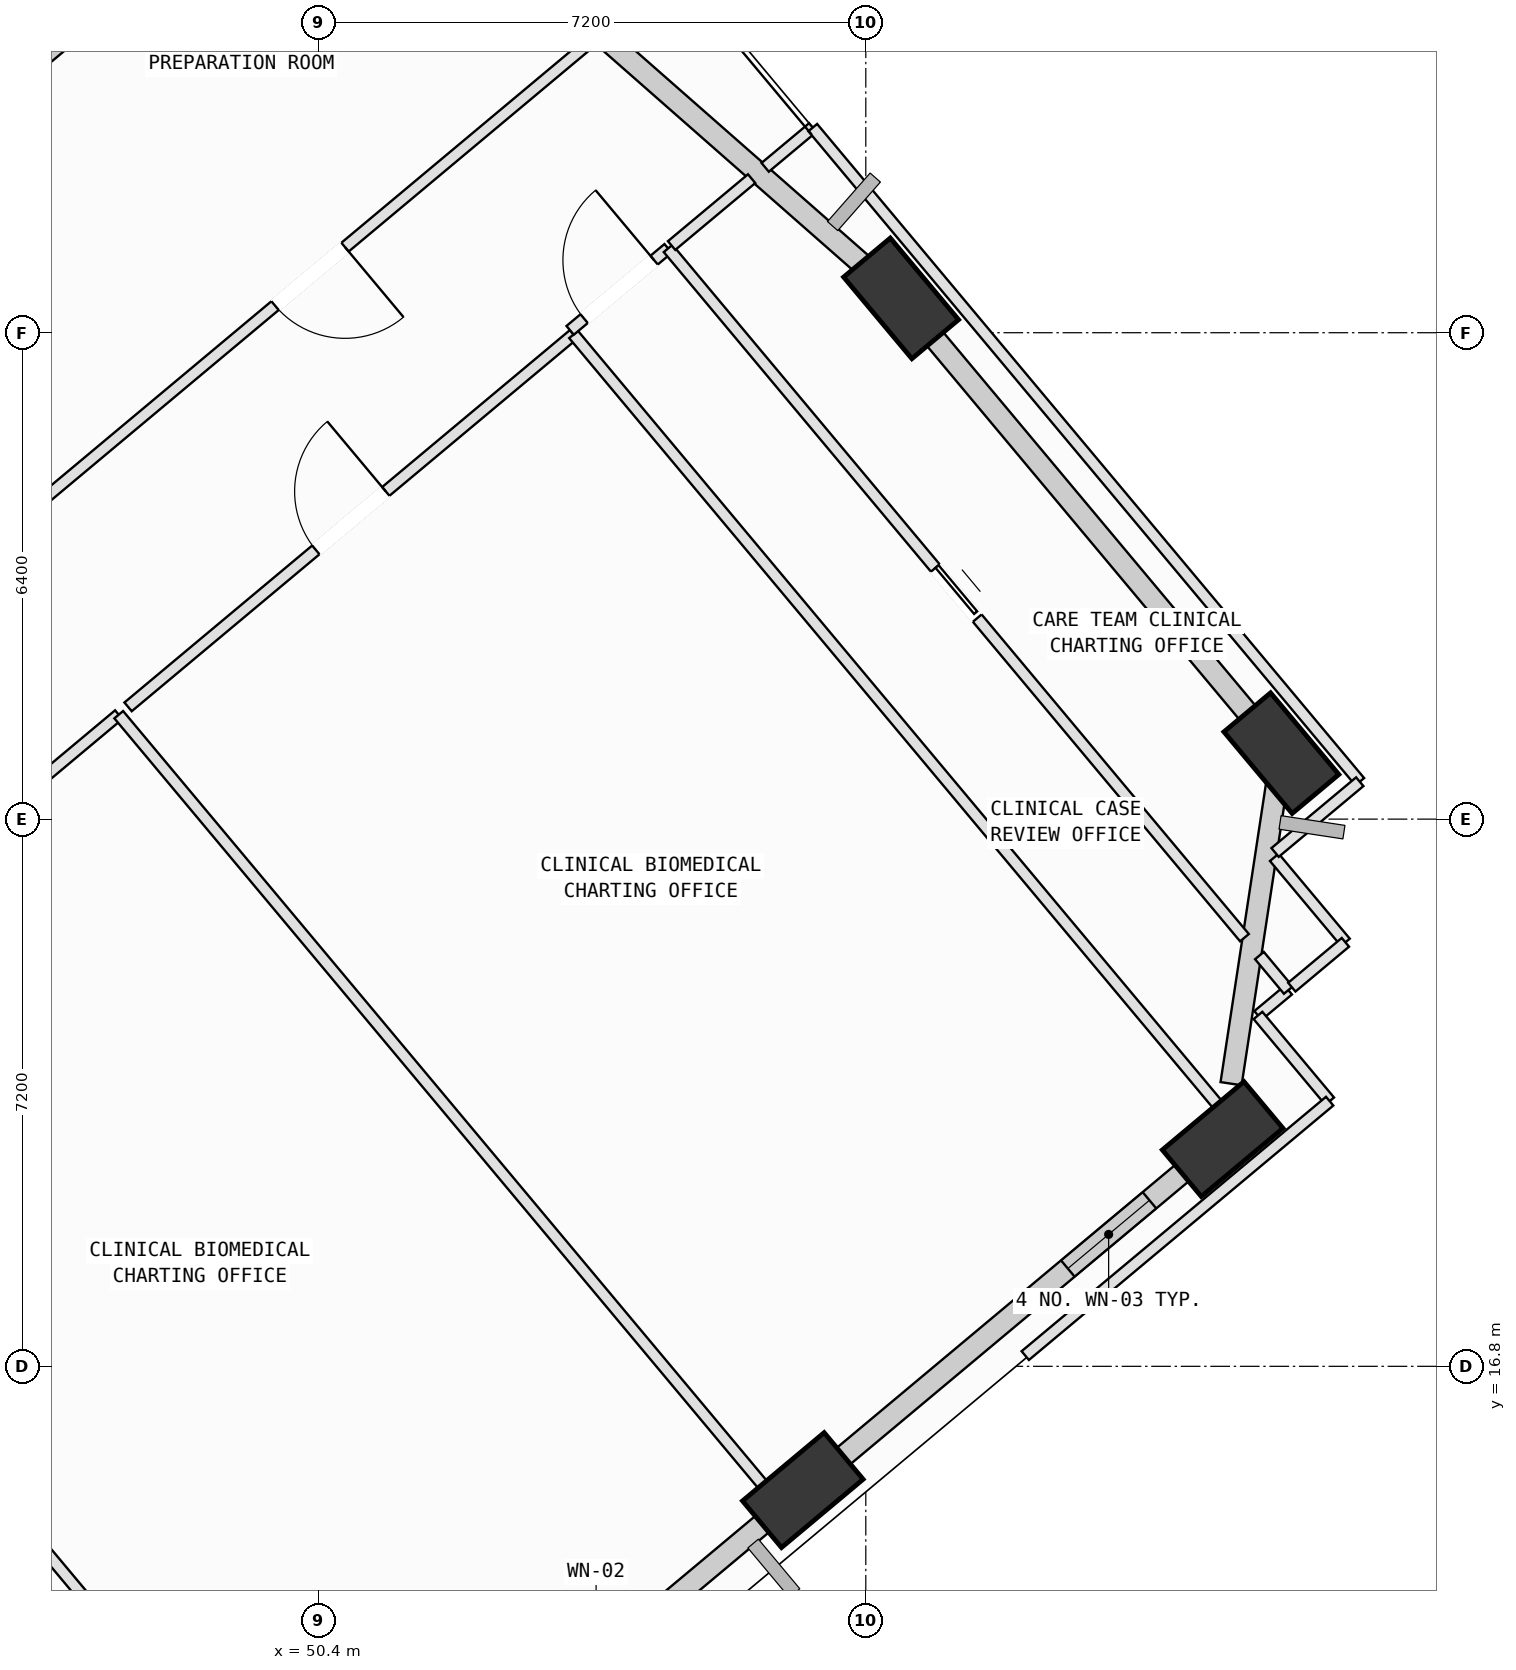
"""IFC4 building model, lengths in metres.
Left out: names, types, materials, properties, quantities, classifications, styles, units other than length and angle.
Written with IfcOpenShell. Run it as: python <this file> out.ifc"""

import sys

from ifc_helpers import new_model, si_unit, direction, frame, frame_2d, origin, origin_2d, place, context, subcontext, project, spatial, rectangle, extrude, element, fill, save


model = new_model("IFC4")
c1 = context("Model", 3, precision=1e-05, world=origin(), true_north=direction((0.0, 1.0)))
c2 = subcontext(c1, "Body", "Model", "MODEL_VIEW")
j1 = project(units=[si_unit("LENGTHUNIT", "METRE"), si_unit("PLANEANGLEUNIT", "RADIAN")], contexts=[c1])
p1 = place(None, origin())
s1 = spatial("IfcSite", under=j1, at=p1, CompositionType="ELEMENT")
p2 = place(p1, origin())
s2 = spatial("IfcBuilding", under=s1, at=p2, CompositionType="ELEMENT")
p3 = place(p2, frame((0.0, 0.0, 193.8)))
s3 = spatial("IfcBuildingStorey", under=s2, at=p3, CompositionType="ELEMENT", Elevation=193.8)
p4 = place(p3, frame((56.771, 15.172, 0.002), z_axis=(0.038888663532, 0.095824097484, 0.994638333361), x_axis=(-0.950777266838, -0.302691625146, 0.066335276659)))
e1 = element("IfcColumn", 1, at=p4, inside=s3, PredefinedType="COLUMN", context=c2, shape_type="SweptSolid", body=[
    extrude(rectangle(XDim=1.4, YDim=0.8, at=origin_2d()), origin(), (0.0, 0.0, 1.0), 4.018),
])
p5 = place(p3, frame((62.295, 19.79, 0.002), z_axis=(0.01965074563, 0.118268376478, 0.992787207473), x_axis=(-0.861169473964, -0.50246694011, 0.076903258768)))
e2 = element("IfcColumn", 2, at=p5, inside=s3, PredefinedType="COLUMN", context=c2, shape_type="SweptSolid", body=[
    extrude(rectangle(XDim=1.4, YDim=0.8, at=origin_2d()), origin(), (0.0, 0.0, 1.0), 4.025),
])
p6 = place(p3, frame((63.068, 24.868, 0.002), z_axis=(-0.001273441718, 0.121280163659, 0.992617499467), x_axis=(0.649409600176, -0.754724730488, 0.09304704396)))
e3 = element("IfcColumn", 3, at=p6, inside=s3, PredefinedType="COLUMN", context=c2, shape_type="SweptSolid", body=[
    extrude(rectangle(XDim=1.4, YDim=0.8, at=origin_2d()), origin(), (0.0, 0.0, 1.0), 4.026),
])
p7 = place(p3, frame((58.064, 30.852, 0.002), z_axis=(-0.025762365333, 0.100679809803, 0.994585278611), x_axis=(0.810575889279, -0.580181348715, 0.079726597341)))
e4 = element("IfcColumn", 4, at=p7, inside=s3, PredefinedType="COLUMN", context=c2, shape_type="SweptSolid", body=[
    extrude(rectangle(XDim=1.4, YDim=0.8, at=origin_2d()), origin(), (0.0, 0.0, 1.0), 4.018),
])
p8 = place(p3, frame((56.539, 14.977, 0.0), z_axis=(0.0, 0.0, 1.0), x_axis=(-0.767164687181, -0.641450187265, 0.0)))
e5 = element("IfcWall", 5, at=p8, inside=s3, PredefinedType="SOLIDWALL", context=c2, shape_type="SweptSolid", body=[
    extrude(rectangle(XDim=6.218, YDim=0.28, at=frame_2d((3.109, 0.0))), origin(), (0.0, 0.0, 1.0), 3.265),
])
p9 = place(p8, frame((2.242, 0.0, 0.75)))
e6 = element("IfcOpeningElement", 6, at=p9, cuts=e5, PredefinedType="OPENING", context=c2, shape_type="SweptSolid", body=[
    extrude(rectangle(XDim=2.0, YDim=1.95, at=frame_2d((1.0, 0.975))), frame((0.0, 0.15, 0.0), z_axis=(0.0, -1.0, 0.0), x_axis=(1.0, 0.0, 0.0)), (0.0, 0.0, 1.0), 0.3),
])
p10 = place(p3, frame((62.074, 19.605, 0.0), z_axis=(0.0, 0.0, 1.0), x_axis=(-0.76717519445, -0.641437620522, 0.0)))
e7 = element("IfcWall", 7, at=p10, inside=s3, PredefinedType="SOLIDWALL", context=c2, shape_type="SweptSolid", body=[
    extrude(rectangle(XDim=6.242, YDim=0.28, at=frame_2d((3.121, 0.0))), origin(), (0.0, 0.0, 1.0), 3.265),
])
p11 = place(p10, frame((0.968, 0.0, 0.75)))
e8 = element("IfcOpeningElement", 8, at=p11, cuts=e7, PredefinedType="OPENING", context=c2, shape_type="SweptSolid", body=[
    extrude(rectangle(XDim=1.4, YDim=1.85, at=frame_2d((0.7, 0.925))), frame((0.0, 0.15, 0.0), z_axis=(0.0, -1.0, 0.0), x_axis=(1.0, 0.0, 0.0)), (0.0, 0.0, 1.0), 0.3),
])
p12 = place(p3, frame((63.03, 24.617, 0.0), z_axis=(0.0, 0.0, 1.0), x_axis=(-0.150419472424, -0.988622264728, 0.0)))
e9 = element("IfcWall", 9, at=p12, inside=s3, PredefinedType="SOLIDWALL", context=c2, shape_type="SweptSolid", body=[
    extrude(rectangle(XDim=4.145, YDim=0.28, at=frame_2d((2.073, 0.0))), origin(), (0.0, 0.0, 1.0), 3.265),
])
p13 = place(p3, frame((58.256, 30.622, 0.0), z_axis=(0.0, 0.0, 1.0), x_axis=(0.641450946277, -0.767164052547, 0.0)))
e10 = element("IfcWall", 10, at=p13, inside=s3, PredefinedType="SOLIDWALL", context=c2, shape_type="SweptSolid", body=[
    extrude(rectangle(XDim=6.84, YDim=0.28, at=frame_2d((3.42, 0.0))), origin(), (0.0, 0.0, 1.0), 3.265),
])
p14 = place(p3, frame((50.934, 37.118, 0.0), z_axis=(0.0, 0.0, 1.0), x_axis=(0.751139162676, -0.660143892114, 0.0)))
e11 = element("IfcWall", 11, at=p14, inside=s3, PredefinedType="SOLIDWALL", context=c2, shape_type="SweptSolid", body=[
    extrude(rectangle(XDim=8.838, YDim=0.28, at=frame_2d((4.419, 0.0))), origin(), (0.0, 0.0, 1.0), 3.265),
])
p15 = place(p3, frame((46.197, 33.573, 0.0), z_axis=(0.0, 0.0, 1.0), x_axis=(0.767164976139, 0.641449841675, 0.0)))
e12 = element("IfcWall", 12, at=p15, inside=s3, PredefinedType="SOLIDWALL", context=c2, shape_type="SweptSolid", body=[
    extrude(rectangle(XDim=5.405, YDim=0.28, at=frame_2d((2.702, 0.0))), origin(), (0.0, 0.0, 1.0), 3.265),
])
p16 = place(p15, frame((1.698, 0.0, 0.75)))
e13 = element("IfcOpeningElement", 13, at=p16, cuts=e12, PredefinedType="OPENING", context=c2, shape_type="SweptSolid", body=[
    extrude(rectangle(XDim=2.0, YDim=1.95, at=frame_2d((1.0, 0.975))), frame((0.0, 0.15, 0.0), z_axis=(0.0, -1.0, 0.0), x_axis=(1.0, 0.0, 0.0)), (0.0, 0.0, 1.0), 0.3),
])
p17 = place(p3, frame((41.82, 20.333, 0.0), z_axis=(0.0, 0.0, 1.0), x_axis=(0.641441854708, -0.767171654213, 0.0)))
e14 = element("IfcWall", 14, at=p17, inside=s3, PredefinedType="PARTITIONING", context=c2, shape_type="SweptSolid", body=[
    extrude(rectangle(XDim=13.435, YDim=0.15, at=frame_2d((6.718, 0.0))), origin(), (0.0, 0.0, 1.0), 3.78),
])
p18 = place(p3, frame((41.91, 20.473, 0.0), z_axis=(0.0, 0.0, 1.0), x_axis=(0.767133193251, 0.641487851648, 0.0)))
e15 = element("IfcWall", 15, at=p18, inside=s3, PredefinedType="PARTITIONING", context=c2, shape_type="SweptSolid", body=[
    extrude(rectangle(XDim=7.64, YDim=0.15, at=frame_2d((3.82, 0.0))), origin(), (0.0, 0.0, 1.0), 3.065),
])
p19 = place(p18, frame((3.22, 0.0, 0.0)))
e16 = element("IfcOpeningElement", 16, at=p19, cuts=e15, PredefinedType="OPENING", context=c2, shape_type="SweptSolid", body=[
    extrude(rectangle(XDim=1.2, YDim=2.15, at=frame_2d((0.6, 1.075))), frame((0.0, 0.085, 0.0), z_axis=(0.0, -1.0, 0.0), x_axis=(1.0, 0.0, 0.0)), (0.0, 0.0, 1.0), 0.17),
])
p20 = place(p3, frame((47.771, 25.374, 0.0), z_axis=(0.0, 0.0, 1.0), x_axis=(0.6415100718, -0.767114611892, 0.0)))
e17 = element("IfcWall", 17, at=p20, inside=s3, PredefinedType="PARTITIONING", context=c2, shape_type="SweptSolid", body=[
    extrude(rectangle(XDim=13.486, YDim=0.15, at=frame_2d((6.743, 0.0))), origin(), (0.0, 0.0, 1.0), 3.78),
])
p21 = place(p3, frame((47.894, 25.477, 0.0), z_axis=(0.0, 0.0, 1.0), x_axis=(0.767198673316, 0.641409538176, 0.0)))
e18 = element("IfcWall", 18, at=p21, inside=s3, PredefinedType="PARTITIONING", context=c2, shape_type="SweptSolid", body=[
    extrude(rectangle(XDim=7.639, YDim=0.15, at=frame_2d((3.82, 0.0))), origin(), (0.0, 0.0, 1.0), 3.78),
])
p22 = place(p21, frame((3.22, 0.0, 0.0)))
e19 = element("IfcOpeningElement", 19, at=p22, cuts=e18, PredefinedType="OPENING", context=c2, shape_type="SweptSolid", body=[
    extrude(rectangle(XDim=1.2, YDim=2.15, at=frame_2d((0.6, 1.075))), frame((0.0, 0.085, 0.0), z_axis=(0.0, -1.0, 0.0), x_axis=(1.0, 0.0, 0.0)), (0.0, 0.0, 1.0), 0.17),
])
p23 = place(p3, frame((53.755, 30.377, 0.0), z_axis=(0.0, 0.0, 1.0), x_axis=(0.641485701033, -0.767134991621, 0.0)))
e20 = element("IfcWall", 20, at=p23, inside=s3, PredefinedType="PARTITIONING", context=c2, shape_type="SweptSolid", body=[
    extrude(rectangle(XDim=13.831, YDim=0.15, at=frame_2d((6.915, 0.0))), origin(), (0.0, 0.0, 1.0), 3.78),
])
p24 = place(p3, frame((62.627, 19.767, 0.0), z_axis=(0.0, 0.0, 1.0), x_axis=(-0.767652058526, -0.640866848137, 0.0)))
e21 = element("IfcWall", 21, at=p24, inside=s3, PredefinedType="PARTITIONING", context=c2, shape_type="SweptSolid", body=[
    extrude(rectangle(XDim=0.528, YDim=0.15, at=frame_2d((0.264, 0.0))), origin(), (0.0, 0.0, 1.0), 3.78),
])
p25 = place(p3, frame((57.433, 15.425, 0.0), z_axis=(0.0, 0.0, 1.0), x_axis=(-0.767508262314, -0.64103905285, 0.0)))
e22 = element("IfcWall", 22, at=p25, inside=s3, PredefinedType="PARTITIONING", context=c2, shape_type="SweptSolid", body=[
    extrude(rectangle(XDim=0.871, YDim=0.15, at=frame_2d((0.435, 0.0))), origin(), (0.0, 0.0, 1.0), 3.265),
])
p26 = place(p3, frame((54.015, 34.257, 0.0), z_axis=(0.0, 0.0, 1.0), x_axis=(-0.767176013294, -0.641436641163, 0.0)))
e23 = element("IfcWall", 23, at=p26, inside=s3, PredefinedType="PARTITIONING", context=c2, shape_type="SweptSolid", body=[
    extrude(rectangle(XDim=9.716, YDim=0.15, at=frame_2d((4.858, 0.0))), origin(), (0.0, 0.0, 1.0), 3.78),
])
p27 = place(p26, frame((4.258, 0.0, 0.0)))
e24 = element("IfcOpeningElement", 24, at=p27, cuts=e23, PredefinedType="OPENING", context=c2, shape_type="SweptSolid", body=[
    extrude(rectangle(XDim=1.2, YDim=2.15, at=frame_2d((0.6, 1.075))), frame((0.0, 0.085, 0.0), z_axis=(0.0, -1.0, 0.0), x_axis=(1.0, 0.0, 0.0)), (0.0, 0.0, 1.0), 0.17),
])
p28 = place(p3, frame((43.328, 31.891, 0.0), z_axis=(0.0, 0.0, 1.0), x_axis=(0.767175162843, 0.641437658324, 0.0)))
e25 = element("IfcWall", 25, at=p28, inside=s3, PredefinedType="PARTITIONING", context=c2, shape_type="SweptSolid", body=[
    extrude(rectangle(XDim=9.689, YDim=0.15, at=frame_2d((4.844, 0.0))), origin(), (0.0, 0.0, 1.0), 3.065),
])
p29 = place(p3, frame((63.159, 21.75, 0.0), z_axis=(0.0, 0.0, 1.0), x_axis=(-0.767681872286, -0.640831134515, 0.0)))
e26 = element("IfcWall", 26, at=p29, inside=s3, PredefinedType="PARTITIONING", context=c2, shape_type="SweptSolid", body=[
    extrude(rectangle(XDim=0.52, YDim=0.15, at=frame_2d((0.26, 0.0))), origin(), (0.0, 0.0, 1.0), 3.78),
])
p30 = place(p3, frame((62.76, 21.417, 0.0), z_axis=(0.0, 0.0, 1.0), x_axis=(0.641359746983, -0.767240298048, 0.0)))
e27 = element("IfcWall", 27, at=p30, inside=s3, PredefinedType="PARTITIONING", context=c2, shape_type="SweptSolid", body=[
    extrude(rectangle(XDim=1.47, YDim=0.15, at=frame_2d((0.735, 0.0))), origin(), (0.0, 0.0, 1.0), 3.78),
])
p31 = place(p3, frame((63.703, 20.289, 0.0), z_axis=(0.0, 0.0, 1.0), x_axis=(-0.767208256489, -0.641398075438, 0.0)))
e28 = element("IfcWall", 28, at=p31, inside=s3, PredefinedType="PARTITIONING", context=c2, shape_type="SweptSolid", body=[
    extrude(rectangle(XDim=5.22, YDim=0.15, at=frame_2d((2.61, 0.0))), origin(), (0.0, 0.0, 1.0), 3.78),
])
p32 = place(p3, frame((53.71, 30.431, 0.0), z_axis=(0.0, 0.0, 1.0), x_axis=(0.767076870152, 0.641555200491, 0.0)))
e29 = element("IfcWall", 29, at=p32, inside=s3, PredefinedType="PARTITIONING", context=c2, shape_type="SweptSolid", body=[
    extrude(rectangle(XDim=1.68, YDim=0.15, at=frame_2d((0.84, 0.0))), origin(), (0.0, 0.0, 1.0), 3.78),
])
p33 = place(p32, frame((0.24, 0.0, 0.0)))
e30 = element("IfcOpeningElement", 30, at=p33, cuts=e29, PredefinedType="OPENING", context=c2, shape_type="SweptSolid", body=[
    extrude(rectangle(XDim=1.2, YDim=2.15, at=frame_2d((0.6, 1.075))), frame((0.0, 0.085, 0.0), z_axis=(0.0, -1.0, 0.0), x_axis=(1.0, 0.0, 0.0)), (0.0, 0.0, 1.0), 0.17),
])
p34 = place(p3, frame((54.999, 31.509, 0.0), z_axis=(0.0, 0.0, 1.0), x_axis=(0.641453119542, -0.767162235404, 0.0)))
e31 = element("IfcWall", 31, at=p34, inside=s3, PredefinedType="PARTITIONING", context=c2, shape_type="SweptSolid", body=[
    extrude(rectangle(XDim=11.822, YDim=0.15, at=frame_2d((5.911, 0.0))), origin(), (0.0, 0.0, 1.0), 3.78),
])
p35 = place(p34, frame((5.481, 0.0, 0.0)))
e32 = element("IfcOpeningElement", 32, at=p35, cuts=e31, PredefinedType="OPENING", context=c2, shape_type="SweptSolid", body=[
    extrude(rectangle(XDim=0.86, YDim=2.06, at=frame_2d((0.43, 1.03))), frame((0.0, 0.085, 0.0), z_axis=(0.0, -1.0, 0.0), x_axis=(1.0, 0.0, 0.0)), (0.0, 0.0, 1.0), 0.17),
])
p36 = place(p3, frame((62.779, 22.205, 0.0), z_axis=(0.0, 0.0, 1.0), x_axis=(0.64083232284, -0.767680880317, 0.0)))
e33 = element("IfcWall", 33, at=p36, inside=s3, PredefinedType="PARTITIONING", context=c2, shape_type="SweptSolid", body=[
    extrude(rectangle(XDim=0.593, YDim=0.15, at=frame_2d((0.296, 0.0))), origin(), (0.0, 0.0, 1.0), 3.78),
])
p37 = place(p3, frame((62.975, 23.497, 0.0), z_axis=(0.0, 0.0, 1.0), x_axis=(0.641402859912, -0.767204256568, 0.0)))
e34 = element("IfcWall", 34, at=p37, inside=s3, PredefinedType="PARTITIONING", context=c2, shape_type="SweptSolid", body=[
    extrude(rectangle(XDim=1.458, YDim=0.15, at=frame_2d((0.729, 0.0))), origin(), (0.0, 0.0, 1.0), 3.78),
])
p38 = place(p3, frame((63.91, 22.379, 0.0), z_axis=(0.0, 0.0, 1.0), x_axis=(-0.766891445719, -0.641776838537, 0.0)))
e35 = element("IfcWall", 35, at=p38, inside=s3, PredefinedType="PARTITIONING", context=c2, shape_type="SweptSolid", body=[
    extrude(rectangle(XDim=0.919, YDim=0.15, at=frame_2d((0.459, 0.0))), origin(), (0.0, 0.0, 1.0), 3.78),
])
p39 = place(p3, frame((55.045, 31.547, 0.0), z_axis=(0.0, 0.0, 1.0), x_axis=(0.767360162817, 0.641216328957, 0.0)))
e36 = element("IfcWall", 36, at=p39, inside=s3, PredefinedType="PARTITIONING", context=c2, shape_type="SweptSolid", body=[
    extrude(rectangle(XDim=1.372, YDim=0.15, at=frame_2d((0.686, 0.0))), origin(), (0.0, 0.0, 1.0), 3.78),
])
p40 = place(p3, frame((56.276, 32.576, 0.0), z_axis=(0.0, 0.0, 1.0), x_axis=(0.767411392913, 0.641155015599, 0.0)))
e37 = element("IfcWall", 37, at=p40, inside=s3, PredefinedType="PARTITIONING", context=c2, shape_type="SweptSolid", body=[
    extrude(rectangle(XDim=0.816, YDim=0.15, at=frame_2d((0.408, 0.0))), origin(), (0.0, 0.0, 1.0), 3.78),
])
p41 = place(p3, frame((56.902, 33.099, 0.0), z_axis=(0.0, 0.0, 1.0), x_axis=(0.641465569616, -0.767151825259, 0.0)))
e38 = element("IfcWall", 38, at=p41, inside=s3, PredefinedType="PARTITIONING", context=c2, shape_type="SweptSolid", body=[
    extrude(rectangle(XDim=11.22, YDim=0.15, at=frame_2d((5.61, 0.0))), origin(), (0.0, 0.0, 1.0), 3.265),
])
p42 = place(p3, frame((64.099, 24.492, 0.0), z_axis=(0.0, 0.0, 1.0), x_axis=(-0.767352162487, -0.641225903038, 0.0)))
e39 = element("IfcWall", 39, at=p42, inside=s3, PredefinedType="PARTITIONING", context=c2, shape_type="SweptSolid", body=[
    extrude(rectangle(XDim=1.452, YDim=0.15, at=frame_2d((0.726, 0.0))), origin(), (0.0, 0.0, 1.0), 3.78),
])
p43 = place(p11, origin())
e40 = element("IfcWindow", 40, at=p43, inside=s3, PartitioningType="SINGLE_PANEL", PredefinedType="WINDOW", context=c2, shape_type="SweptSolid", body=[
    extrude(rectangle(XDim=1.4, YDim=1.85, at=frame_2d((0.7, 0.925))), frame((0.0, 0.03, 0.0), z_axis=(0.0, -1.0, 0.0), x_axis=(1.0, 0.0, 0.0)), (0.0, 0.0, 1.0), 0.06),
])
fill(e8, e40)
p44 = place(p22, origin())
e41 = element("IfcDoor", 41, at=p44, inside=s3, OperationType="SINGLE_SWING_RIGHT", PredefinedType="DOOR", context=c2, shape_type="SweptSolid", body=[
    extrude(rectangle(XDim=1.2, YDim=2.15, at=frame_2d((0.6, 1.075))), frame((0.0, 0.025, 0.0), z_axis=(0.0, -1.0, 0.0), x_axis=(1.0, 0.0, 0.0)), (0.0, 0.0, 1.0), 0.05),
])
fill(e19, e41)
p45 = place(p27, origin())
e42 = element("IfcDoor", 42, at=p45, inside=s3, OperationType="SINGLE_SWING_LEFT", PredefinedType="DOOR", context=c2, shape_type="SweptSolid", body=[
    extrude(rectangle(XDim=1.2, YDim=2.15, at=frame_2d((0.6, 1.075))), frame((0.0, 0.025, 0.0), z_axis=(0.0, -1.0, 0.0), x_axis=(1.0, 0.0, 0.0)), (0.0, 0.0, 1.0), 0.05),
])
fill(e24, e42)
p46 = place(p33, origin())
e43 = element("IfcDoor", 43, at=p46, inside=s3, OperationType="SINGLE_SWING_RIGHT", PredefinedType="DOOR", context=c2, shape_type="SweptSolid", body=[
    extrude(rectangle(XDim=1.2, YDim=2.15, at=frame_2d((0.6, 1.075))), frame((0.0, 0.025, 0.0), z_axis=(0.0, -1.0, 0.0), x_axis=(1.0, 0.0, 0.0)), (0.0, 0.0, 1.0), 0.05),
])
fill(e30, e43)
p47 = place(p35, origin())
e44 = element("IfcDoor", 44, at=p47, inside=s3, OperationType="SLIDING_TO_LEFT", PredefinedType="DOOR", context=c2, shape_type="SweptSolid", body=[
    extrude(rectangle(XDim=0.86, YDim=2.06, at=frame_2d((0.43, 1.03))), frame((0.0, 0.025, 0.0), z_axis=(0.0, -1.0, 0.0), x_axis=(1.0, 0.0, 0.0)), (0.0, 0.0, 1.0), 0.05),
])
fill(e32, e44)
save(model, sys.argv[1])
